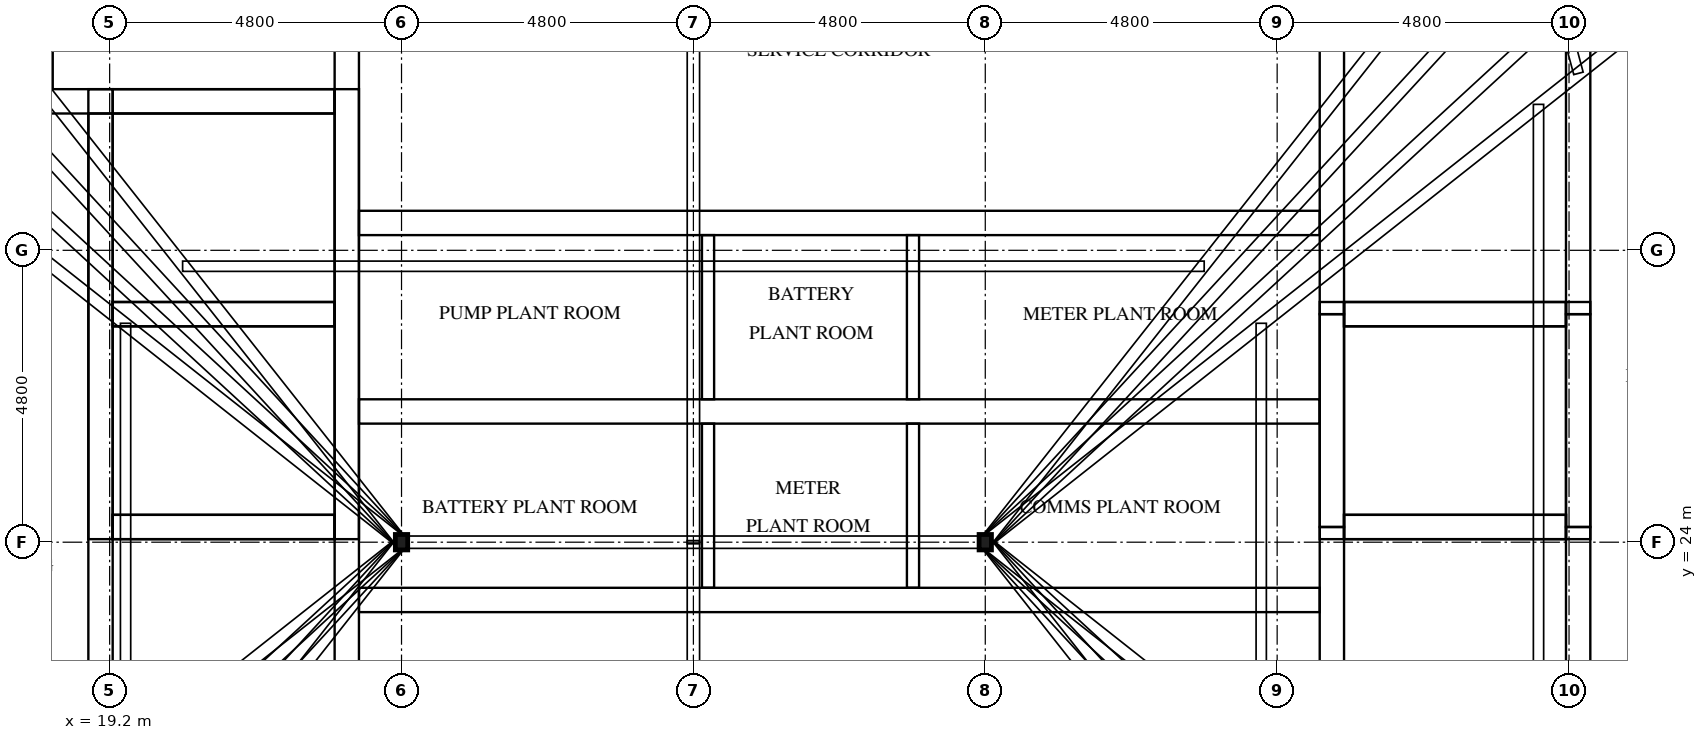
"""IFC4 building model, lengths in metres.
Left out: names, types, materials, properties, quantities, classifications, styles, units other than length and angle.
Written with IfcOpenShell. Run it as: python <this file> out.ifc"""

import sys

from ifc_helpers import new_model, si_unit, direction, frame, frame_2d, origin, origin_2d, place, context, subcontext, project, spatial, rectangle, hollow_rectangle, extrude, element, fill, save


model = new_model("IFC4")
c1 = context("Model", 3, precision=1e-05, world=origin(), true_north=direction((0.0, 1.0)))
c2 = subcontext(c1, "Body", "Model", "MODEL_VIEW")
j1 = project(units=[si_unit("LENGTHUNIT", "METRE"), si_unit("PLANEANGLEUNIT", "RADIAN")], contexts=[c1])
p1 = place(None, origin())
s1 = spatial("IfcSite", under=j1, at=p1, CompositionType="ELEMENT")
p2 = place(p1, origin())
s2 = spatial("IfcBuilding", under=s1, at=p2, CompositionType="ELEMENT")
p3 = place(p2, frame((0.0, 0.0, 317.3)))
s3 = spatial("IfcBuildingStorey", under=s2, at=p3, CompositionType="ELEMENT", Elevation=317.3)
p4 = place(p3, frame((19.05, 15.5, 0.0), z_axis=(0.0, 0.0, 1.0), x_axis=(0.0, 1.0, 0.0)))
e1 = element("IfcWall", 1, at=p4, inside=s3, PredefinedType="SHEAR", context=c2, shape_type="SweptSolid", body=[
    extrude(rectangle(XDim=15.55, YDim=0.4, at=frame_2d((7.775, 0.0))), origin(), (0.0, 0.0, 1.0), 3.0),
])
p5 = place(p4, frame((9.95, 0.0, 0.0)))
e2 = element("IfcOpeningElement", 2, at=p5, cuts=e1, PredefinedType="OPENING", context=c2, shape_type="SweptSolid", body=[
    extrude(rectangle(XDim=1.1, YDim=2.1, at=frame_2d((0.55, 1.05))), frame((0.0, 0.21, 0.0), z_axis=(0.0, -1.0, 0.0), x_axis=(1.0, 0.0, 0.0)), (0.0, 0.0, 1.0), 0.42),
])
p6 = place(p4, frame((13.45, 0.0, 0.0)))
e3 = element("IfcOpeningElement", 3, at=p6, cuts=e1, PredefinedType="OPENING", context=c2, shape_type="SweptSolid", body=[
    extrude(rectangle(XDim=1.1, YDim=2.1, at=frame_2d((0.55, 1.05))), frame((0.0, 0.21, 0.0), z_axis=(0.0, -1.0, 0.0), x_axis=(1.0, 0.0, 0.0)), (0.0, 0.0, 1.0), 0.42),
])
p7 = place(p4, frame((0.7, 0.0, 0.0)))
e4 = element("IfcOpeningElement", 4, at=p7, cuts=e1, PredefinedType="OPENING", context=c2, shape_type="SweptSolid", body=[
    extrude(rectangle(XDim=1.2, YDim=2.1, at=frame_2d((0.6, 1.05))), frame((0.0, 0.21, 0.0), z_axis=(0.0, -1.0, 0.0), x_axis=(1.0, 0.0, 0.0)), (0.0, 0.0, 1.0), 0.42),
])
p8 = place(p3, frame((23.1, 15.5, 0.0), z_axis=(0.0, 0.0, 1.0), x_axis=(0.0, 1.0, 0.0)))
e5 = element("IfcWall", 5, at=p8, inside=s3, PredefinedType="SHEAR", context=c2, shape_type="SweptSolid", body=[
    extrude(rectangle(XDim=21.8, YDim=0.4, at=frame_2d((10.9, 0.0))), origin(), (0.0, 0.0, 1.0), 3.0),
])
p9 = place(p3, frame((39.3, 15.5, 0.0), z_axis=(0.0, 0.0, 1.0), x_axis=(0.0, 1.0, 0.0)))
e6 = element("IfcWall", 6, at=p9, inside=s3, PredefinedType="SHEAR", context=c2, shape_type="SweptSolid", body=[
    extrude(rectangle(XDim=8.75, YDim=0.4, at=frame_2d((4.375, 0.0))), origin(), (0.0, 0.0, 1.0), 3.0),
])
p10 = place(p3, frame((39.3, 24.25, 0.0), z_axis=(0.0, 0.0, 1.0), x_axis=(0.0, 1.0, 0.0)))
e7 = element("IfcWall", 7, at=p10, inside=s3, PredefinedType="SHEAR", context=c2, shape_type="SweptSolid", body=[
    extrude(rectangle(XDim=3.5, YDim=0.4, at=frame_2d((1.75, 0.0))), origin(), (0.0, 0.0, 1.0), 3.0),
])
p11 = place(p3, frame((39.3, 27.75, 0.0), z_axis=(0.0, 0.0, 1.0), x_axis=(0.0, 1.0, 0.0)))
e8 = element("IfcWall", 8, at=p11, inside=s3, PredefinedType="SHEAR", context=c2, shape_type="SweptSolid", body=[
    extrude(rectangle(XDim=9.55, YDim=0.4, at=frame_2d((4.775, 0.0))), origin(), (0.0, 0.0, 1.0), 3.0),
])
p12 = place(p3, frame((43.35, 15.5, 0.0), z_axis=(0.0, 0.0, 1.0), x_axis=(0.0, 1.0, 0.0)))
e9 = element("IfcWall", 9, at=p12, inside=s3, PredefinedType="SHEAR", context=c2, shape_type="SweptSolid", body=[
    extrude(rectangle(XDim=8.75, YDim=0.4, at=frame_2d((4.375, 0.0))), origin(), (0.0, 0.0, 1.0), 3.0),
])
p13 = place(p12, frame((0.7, 0.0, 0.0)))
e10 = element("IfcOpeningElement", 10, at=p13, cuts=e9, PredefinedType="OPENING", context=c2, shape_type="SweptSolid", body=[
    extrude(rectangle(XDim=1.2, YDim=2.1, at=frame_2d((0.6, 1.05))), frame((0.0, 0.21, 0.0), z_axis=(0.0, -1.0, 0.0), x_axis=(1.0, 0.0, 0.0)), (0.0, 0.0, 1.0), 0.42),
])
p14 = place(p3, frame((43.35, 24.25, 0.0), z_axis=(0.0, 0.0, 1.0), x_axis=(0.0, 1.0, 0.0)))
e11 = element("IfcWall", 11, at=p14, inside=s3, PredefinedType="SHEAR", context=c2, shape_type="SweptSolid", body=[
    extrude(rectangle(XDim=3.5, YDim=0.4, at=frame_2d((1.75, 0.0))), origin(), (0.0, 0.0, 1.0), 3.0),
])
p15 = place(p14, frame((1.2, 0.0, 0.0)))
e12 = element("IfcOpeningElement", 12, at=p15, cuts=e11, PredefinedType="OPENING", context=c2, shape_type="SweptSolid", body=[
    extrude(rectangle(XDim=1.1, YDim=2.1, at=frame_2d((0.55, 1.05))), frame((0.0, 0.21, 0.0), z_axis=(0.0, -1.0, 0.0), x_axis=(1.0, 0.0, 0.0)), (0.0, 0.0, 1.0), 0.42),
])
p16 = place(p3, frame((43.35, 27.75, 0.0), z_axis=(0.0, 0.0, 1.0), x_axis=(0.0, 1.0, 0.0)))
e13 = element("IfcWall", 13, at=p16, inside=s3, PredefinedType="SHEAR", context=c2, shape_type="SweptSolid", body=[
    extrude(rectangle(XDim=9.55, YDim=0.4, at=frame_2d((4.775, 0.0))), origin(), (0.0, 0.0, 1.0), 3.0),
])
p17 = place(p16, frame((7.65, 0.0, 0.0)))
e14 = element("IfcOpeningElement", 14, at=p17, cuts=e13, PredefinedType="OPENING", context=c2, shape_type="SweptSolid", body=[
    extrude(rectangle(XDim=1.2, YDim=2.1, at=frame_2d((0.6, 1.05))), frame((0.0, 0.21, 0.0), z_axis=(0.0, -1.0, 0.0), x_axis=(1.0, 0.0, 0.0)), (0.0, 0.0, 1.0), 0.42),
])
for number, where, z_axis, x_axis in (
    (15, (19.25, 24.25, 0.0), (0.0, 0.0, 1.0), (1.0, 0.0, 0.0)),
    (16, (19.25, 27.75, 0.0), (0.0, 0.0, 1.0), (1.0, 0.0, 0.0)),
):
    element("IfcWall", number, at=place(p3, frame(where, z_axis=z_axis, x_axis=x_axis)), inside=s3, PredefinedType="SHEAR", context=c2, shape_type="SweptSolid", body=[
        extrude(rectangle(XDim=3.65, YDim=0.4, at=frame_2d((1.825, 0.0))), origin(), (0.0, 0.0, 1.0), 3.0),
    ])
p18 = place(p3, frame((15.5, 31.25, 0.0), z_axis=(0.0, 0.0, 1.0), x_axis=(1.0, 0.0, 0.0)))
e17 = element("IfcWall", 17, at=p18, inside=s3, PredefinedType="SHEAR", context=c2, shape_type="SweptSolid", body=[
    extrude(rectangle(XDim=7.4, YDim=0.4, at=frame_2d((3.7, 0.0))), origin(), (0.0, 0.0, 1.0), 3.0),
])
for number, where, z_axis, x_axis in (
    (18, (39.5, 24.25, 0.0), (0.0, 0.0, 1.0), (1.0, 0.0, 0.0)),
    (19, (39.5, 27.75, 0.0), (0.0, 0.0, 1.0), (1.0, 0.0, 0.0)),
):
    element("IfcWall", number, at=place(p3, frame(where, z_axis=z_axis, x_axis=x_axis)), inside=s3, PredefinedType="SHEAR", context=c2, shape_type="SweptSolid", body=[
        extrude(rectangle(XDim=3.65, YDim=0.4, at=frame_2d((1.825, 0.0))), origin(), (0.0, 0.0, 1.0), 3.0),
    ])
p19 = place(p3, frame((23.3, 23.05, 0.0), z_axis=(0.0, 0.0, 1.0), x_axis=(1.0, 0.0, 0.0)))
e20 = element("IfcWall", 20, at=p19, inside=s3, PredefinedType="SHEAR", context=c2, shape_type="SweptSolid", body=[
    extrude(rectangle(XDim=15.8, YDim=0.4, at=frame_2d((7.9, 0.0))), origin(), (0.0, 0.0, 1.0), 3.0),
])
p20 = place(p19, frame((2.32, 0.0, 0.0)))
e21 = element("IfcOpeningElement", 21, at=p20, cuts=e20, PredefinedType="OPENING", context=c2, shape_type="SweptSolid", body=[
    extrude(rectangle(XDim=1.0, YDim=2.1, at=frame_2d((0.5, 1.05))), frame((0.0, 0.21, 0.0), z_axis=(0.0, -1.0, 0.0), x_axis=(1.0, 0.0, 0.0)), (0.0, 0.0, 1.0), 0.42),
])
p21 = place(p19, frame((6.926, 0.0, 0.0)))
e22 = element("IfcOpeningElement", 22, at=p21, cuts=e20, PredefinedType="OPENING", context=c2, shape_type="SweptSolid", body=[
    extrude(rectangle(XDim=1.0, YDim=2.1, at=frame_2d((0.5, 1.05))), frame((0.0, 0.21, 0.0), z_axis=(0.0, -1.0, 0.0), x_axis=(1.0, 0.0, 0.0)), (0.0, 0.0, 1.0), 0.42),
])
p22 = place(p19, frame((12.006, 0.0, 0.0)))
e23 = element("IfcOpeningElement", 23, at=p22, cuts=e20, PredefinedType="OPENING", context=c2, shape_type="SweptSolid", body=[
    extrude(rectangle(XDim=1.0, YDim=2.1, at=frame_2d((0.5, 1.05))), frame((0.0, 0.21, 0.0), z_axis=(0.0, -1.0, 0.0), x_axis=(1.0, 0.0, 0.0)), (0.0, 0.0, 1.0), 0.42),
])
p23 = place(p3, frame((23.3, 26.15, 0.0), z_axis=(0.0, 0.0, 1.0), x_axis=(1.0, 0.0, 0.0)))
e24 = element("IfcWall", 24, at=p23, inside=s3, PredefinedType="SHEAR", context=c2, shape_type="SweptSolid", body=[
    extrude(rectangle(XDim=15.8, YDim=0.4, at=frame_2d((7.9, 0.0))), origin(), (0.0, 0.0, 1.0), 3.0),
])
p24 = place(p3, frame((23.3, 29.25, 0.0), z_axis=(0.0, 0.0, 1.0), x_axis=(1.0, 0.0, 0.0)))
e25 = element("IfcWall", 25, at=p24, inside=s3, PredefinedType="SHEAR", context=c2, shape_type="SweptSolid", body=[
    extrude(rectangle(XDim=15.8, YDim=0.4, at=frame_2d((7.9, 0.0))), origin(), (0.0, 0.0, 1.0), 3.0),
])
p25 = place(p24, frame((2.32, 0.0, 0.0)))
e26 = element("IfcOpeningElement", 26, at=p25, cuts=e25, PredefinedType="OPENING", context=c2, shape_type="SweptSolid", body=[
    extrude(rectangle(XDim=1.0, YDim=2.1, at=frame_2d((0.5, 1.05))), frame((0.0, 0.21, 0.0), z_axis=(0.0, -1.0, 0.0), x_axis=(1.0, 0.0, 0.0)), (0.0, 0.0, 1.0), 0.42),
])
p26 = place(p24, frame((6.926, 0.0, 0.0)))
e27 = element("IfcOpeningElement", 27, at=p26, cuts=e25, PredefinedType="OPENING", context=c2, shape_type="SweptSolid", body=[
    extrude(rectangle(XDim=1.0, YDim=2.1, at=frame_2d((0.5, 1.05))), frame((0.0, 0.21, 0.0), z_axis=(0.0, -1.0, 0.0), x_axis=(1.0, 0.0, 0.0)), (0.0, 0.0, 1.0), 0.42),
])
p27 = place(p24, frame((12.006, 0.0, 0.0)))
e28 = element("IfcOpeningElement", 28, at=p27, cuts=e25, PredefinedType="OPENING", context=c2, shape_type="SweptSolid", body=[
    extrude(rectangle(XDim=1.0, YDim=2.1, at=frame_2d((0.5, 1.05))), frame((0.0, 0.21, 0.0), z_axis=(0.0, -1.0, 0.0), x_axis=(1.0, 0.0, 0.0)), (0.0, 0.0, 1.0), 0.42),
])
for number, where, z_axis, x_axis in (
    (29, (19.05, 24.05, 3.0), (0.0, 0.0, 1.0), (0.0, 1.0, 0.0)),
    (30, (23.1, 24.05, 3.0), (0.0, 0.0, 1.0), (0.0, 1.0, 0.0)),
):
    element("IfcWall", number, at=place(p3, frame(where, z_axis=z_axis, x_axis=x_axis)), inside=s3, PredefinedType="SHEAR", context=c2, shape_type="SweptSolid", body=[
        extrude(rectangle(XDim=7.4, YDim=0.4, at=frame_2d((3.7, 0.0))), origin(), (0.0, 0.0, 1.0), 1.5),
    ])
for number, where, z_axis, x_axis in (
    (31, (19.25, 24.25, 3.0), (0.0, 0.0, 1.0), (1.0, 0.0, 0.0)),
    (32, (19.25, 27.75, 3.0), (0.0, 0.0, 1.0), (1.0, 0.0, 0.0)),
    (33, (19.25, 31.25, 3.0), (0.0, 0.0, 1.0), (1.0, 0.0, 0.0)),
):
    element("IfcWall", number, at=place(p3, frame(where, z_axis=z_axis, x_axis=x_axis)), inside=s3, PredefinedType="SHEAR", context=c2, shape_type="SweptSolid", body=[
        extrude(rectangle(XDim=3.65, YDim=0.4, at=frame_2d((1.825, 0.0))), origin(), (0.0, 0.0, 1.0), 1.5),
    ])
for number, where, z_axis, x_axis in (
    (34, (39.3, 24.05, 3.0), (0.0, 0.0, 1.0), (0.0, 1.0, 0.0)),
    (35, (43.35, 24.05, 3.0), (0.0, 0.0, 1.0), (0.0, 1.0, 0.0)),
):
    element("IfcWall", number, at=place(p3, frame(where, z_axis=z_axis, x_axis=x_axis)), inside=s3, PredefinedType="SHEAR", context=c2, shape_type="SweptSolid", body=[
        extrude(rectangle(XDim=3.9, YDim=0.4, at=frame_2d((1.95, 0.0))), origin(), (0.0, 0.0, 1.0), 1.5),
    ])
for number, where, z_axis, x_axis in (
    (36, (39.5, 24.25, 3.0), (0.0, 0.0, 1.0), (1.0, 0.0, 0.0)),
    (37, (39.5, 27.75, 3.0), (0.0, 0.0, 1.0), (1.0, 0.0, 0.0)),
):
    element("IfcWall", number, at=place(p3, frame(where, z_axis=z_axis, x_axis=x_axis)), inside=s3, PredefinedType="SHEAR", context=c2, shape_type="SweptSolid", body=[
        extrude(rectangle(XDim=3.65, YDim=0.4, at=frame_2d((1.825, 0.0))), origin(), (0.0, 0.0, 1.0), 1.5),
    ])
for number, where, z_axis, x_axis in (
    (38, (24.0, 24.0, 0.0), (0.0, 0.0, 1.0), (1.0, 0.0, 0.0)),
    (39, (33.6, 24.0, 0.0), (0.0, 0.0, 1.0), (1.0, 0.0, 0.0)),
):
    element("IfcColumn", number, at=place(p3, frame(where, z_axis=z_axis, x_axis=x_axis)), inside=s3, PredefinedType="COLUMN", context=c2, shape_type="SweptSolid", body=[
        extrude(hollow_rectangle(XDim=0.203, YDim=0.254, WallThickness=0.01, InnerFilletRadius=0.004, OuterFilletRadius=0.013, at=origin_2d()), origin(), (0.0, 0.0, 1.0), 6.995),
    ])
p28 = place(p3, frame((18.164, 31.45, 0.0), z_axis=(0.0, 0.0, 1.0), x_axis=(0.0, 1.0, 0.0)))
e40 = element("IfcWall", 40, at=p28, inside=s3, PredefinedType="PARTITIONING", context=c2, shape_type="SweptSolid", body=[
    extrude(rectangle(XDim=5.85, YDim=0.2, at=frame_2d((2.925, 0.0))), origin(), (0.0, 0.0, 1.0), 3.0),
])
for number, where, z_axis, x_axis in (
    (41, (29.041, 23.25, 0.0), (0.0, 0.0, 1.0), (0.0, 1.0, 0.0)),
    (42, (32.411, 23.25, 0.0), (0.0, 0.0, 1.0), (0.0, 1.0, 0.0)),
    (43, (29.041, 26.35, 0.0), (0.0, 0.0, 1.0), (0.0, 1.0, 0.0)),
    (44, (32.411, 26.35, 0.0), (0.0, 0.0, 1.0), (0.0, 1.0, 0.0)),
):
    element("IfcWall", number, at=place(p3, frame(where, z_axis=z_axis, x_axis=x_axis)), inside=s3, PredefinedType="PARTITIONING", context=c2, shape_type="SweptSolid", body=[
        extrude(rectangle(XDim=2.7, YDim=0.2, at=frame_2d((1.35, 0.0))), origin(), (0.0, 0.0, 1.0), 3.0),
    ])
p29 = place(p5, origin())
e45 = element("IfcDoor", 45, at=p29, inside=s3, OperationType="DOUBLE_DOOR_SLIDING", PredefinedType="DOOR", context=c2, shape_type="SweptSolid", body=[
    extrude(rectangle(XDim=1.1, YDim=2.1, at=frame_2d((0.55, 1.05))), frame((0.0, 0.025, 0.0), z_axis=(0.0, -1.0, 0.0), x_axis=(1.0, 0.0, 0.0)), (0.0, 0.0, 1.0), 0.05),
])
fill(e2, e45)
p30 = place(p6, origin())
e46 = element("IfcDoor", 46, at=p30, inside=s3, OperationType="DOUBLE_DOOR_SLIDING", PredefinedType="DOOR", context=c2, shape_type="SweptSolid", body=[
    extrude(rectangle(XDim=1.1, YDim=2.1, at=frame_2d((0.55, 1.05))), frame((0.0, 0.025, 0.0), z_axis=(0.0, -1.0, 0.0), x_axis=(1.0, 0.0, 0.0)), (0.0, 0.0, 1.0), 0.05),
])
fill(e3, e46)
p31 = place(p15, origin())
e47 = element("IfcDoor", 47, at=p31, inside=s3, OperationType="DOUBLE_DOOR_SLIDING", PredefinedType="DOOR", context=c2, shape_type="SweptSolid", body=[
    extrude(rectangle(XDim=1.1, YDim=2.1, at=frame_2d((0.55, 1.05))), frame((0.0, 0.025, 0.0), z_axis=(0.0, -1.0, 0.0), x_axis=(1.0, 0.0, 0.0)), (0.0, 0.0, 1.0), 0.05),
])
fill(e12, e47)
p32 = place(p20, frame((1.0, 0.0, 0.0), z_axis=(0.0, 0.0, 1.0), x_axis=(-1.0, 0.0, 0.0)))
e48 = element("IfcDoor", 48, at=p32, inside=s3, OperationType="SINGLE_SWING_LEFT", PredefinedType="DOOR", context=c2, shape_type="SweptSolid", body=[
    extrude(rectangle(XDim=1.0, YDim=2.1, at=frame_2d((0.5, 1.05))), frame((0.0, 0.025, 0.0), z_axis=(0.0, -1.0, 0.0), x_axis=(1.0, 0.0, 0.0)), (0.0, 0.0, 1.0), 0.05),
])
fill(e21, e48)
p33 = place(p21, frame((1.0, 0.0, 0.0), z_axis=(0.0, 0.0, 1.0), x_axis=(-1.0, 0.0, 0.0)))
e49 = element("IfcDoor", 49, at=p33, inside=s3, OperationType="SINGLE_SWING_RIGHT", PredefinedType="DOOR", context=c2, shape_type="SweptSolid", body=[
    extrude(rectangle(XDim=1.0, YDim=2.1, at=frame_2d((0.5, 1.05))), frame((0.0, 0.025, 0.0), z_axis=(0.0, -1.0, 0.0), x_axis=(1.0, 0.0, 0.0)), (0.0, 0.0, 1.0), 0.05),
])
fill(e22, e49)
p34 = place(p22, frame((1.0, 0.0, 0.0), z_axis=(0.0, 0.0, 1.0), x_axis=(-1.0, 0.0, 0.0)))
e50 = element("IfcDoor", 50, at=p34, inside=s3, OperationType="SINGLE_SWING_LEFT", PredefinedType="DOOR", context=c2, shape_type="SweptSolid", body=[
    extrude(rectangle(XDim=1.0, YDim=2.1, at=frame_2d((0.5, 1.05))), frame((0.0, 0.025, 0.0), z_axis=(0.0, -1.0, 0.0), x_axis=(1.0, 0.0, 0.0)), (0.0, 0.0, 1.0), 0.05),
])
fill(e23, e50)
p35 = place(p25, origin())
e51 = element("IfcDoor", 51, at=p35, inside=s3, OperationType="SINGLE_SWING_RIGHT", PredefinedType="DOOR", context=c2, shape_type="SweptSolid", body=[
    extrude(rectangle(XDim=1.0, YDim=2.1, at=frame_2d((0.5, 1.05))), frame((0.0, 0.025, 0.0), z_axis=(0.0, -1.0, 0.0), x_axis=(1.0, 0.0, 0.0)), (0.0, 0.0, 1.0), 0.05),
])
fill(e26, e51)
p36 = place(p26, origin())
e52 = element("IfcDoor", 52, at=p36, inside=s3, OperationType="SINGLE_SWING_LEFT", PredefinedType="DOOR", context=c2, shape_type="SweptSolid", body=[
    extrude(rectangle(XDim=1.0, YDim=2.1, at=frame_2d((0.5, 1.05))), frame((0.0, 0.025, 0.0), z_axis=(0.0, -1.0, 0.0), x_axis=(1.0, 0.0, 0.0)), (0.0, 0.0, 1.0), 0.05),
])
fill(e27, e52)
p37 = place(p27, origin())
e53 = element("IfcDoor", 53, at=p37, inside=s3, OperationType="SINGLE_SWING_RIGHT", PredefinedType="DOOR", context=c2, shape_type="SweptSolid", body=[
    extrude(rectangle(XDim=1.0, YDim=2.1, at=frame_2d((0.5, 1.05))), frame((0.0, 0.025, 0.0), z_axis=(0.0, -1.0, 0.0), x_axis=(1.0, 0.0, 0.0)), (0.0, 0.0, 1.0), 0.05),
])
fill(e28, e53)
save(model, sys.argv[1])
